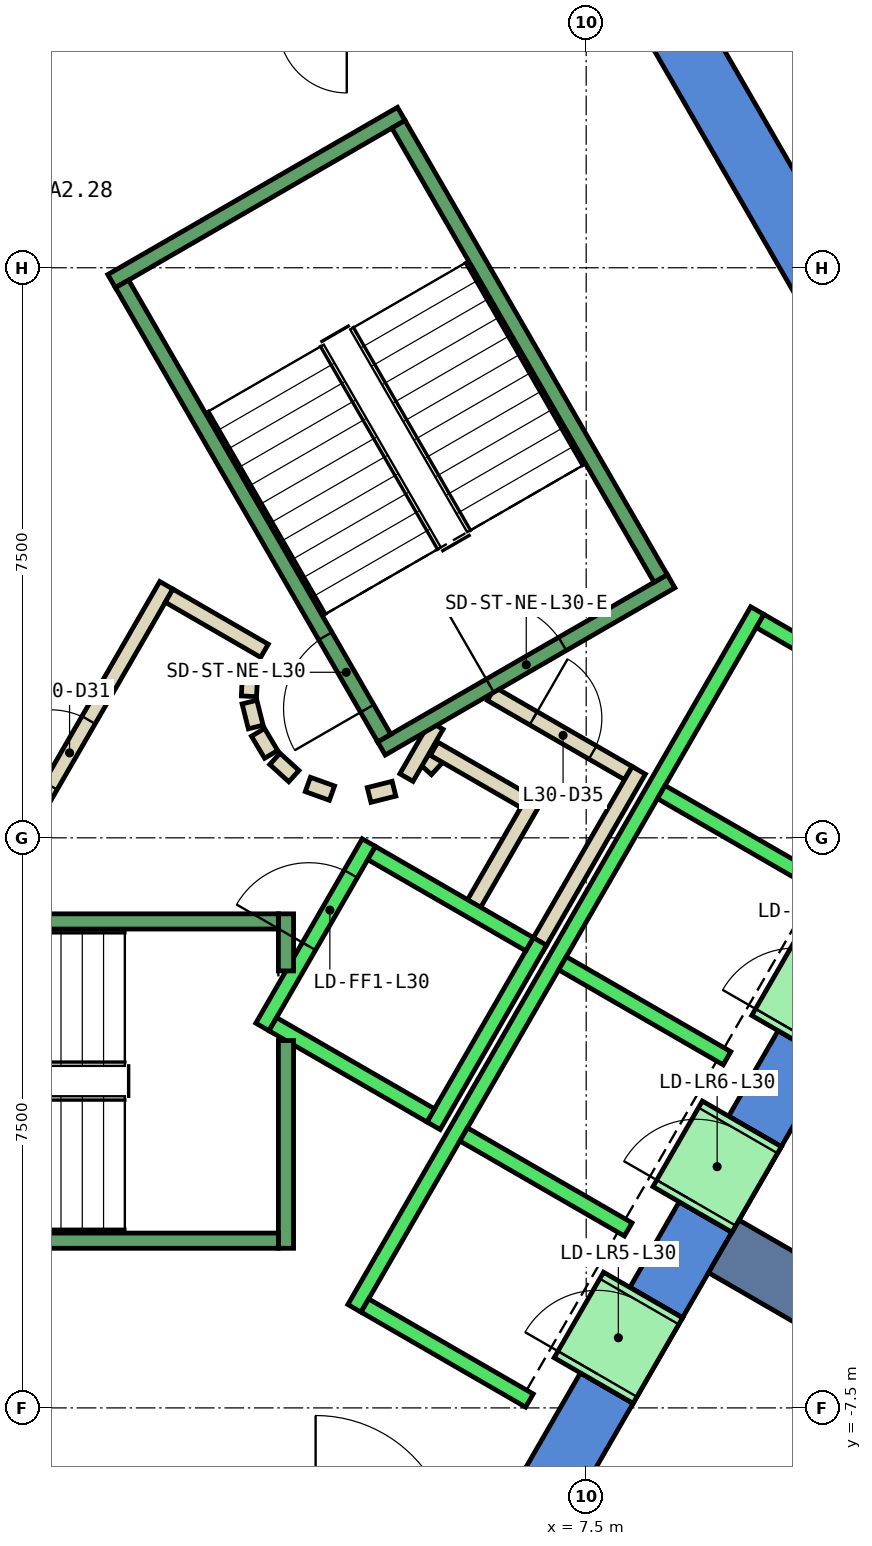
"""IFC4 building model, lengths in metres.
Left out: names, types, materials, properties, quantities, classifications, styles, units other than length and angle.
Written with IfcOpenShell. Run it as: python <this file> out.ifc"""

import sys

from ifc_helpers import new_model, si_unit, direction, frame, frame_2d, origin, place, context, subcontext, project, spatial, polyline, rectangle, outline, extrude, element, fill, save


model = new_model("IFC4")
c1 = context("Model", 3, precision=1e-05, world=origin(), true_north=direction((0.0, 1.0)))
c2 = subcontext(c1, "Body", "Model", "MODEL_VIEW")
j1 = project(units=[si_unit("LENGTHUNIT", "METRE"), si_unit("PLANEANGLEUNIT", "RADIAN")], contexts=[c1])
p1 = place(None, origin())
s1 = spatial("IfcSite", under=j1, at=p1, CompositionType="ELEMENT")
p2 = place(p1, origin())
s2 = spatial("IfcBuilding", under=s1, at=p2, CompositionType="ELEMENT")
p3 = place(p2, frame((0.0, 0.0, 138.2)))
s3 = spatial("IfcBuildingStorey", under=s2, at=p3, CompositionType="ELEMENT", Elevation=138.2)
p4 = place(p3, frame((0.0, 0.0, -0.6)))
e1 = element("IfcWall", 1, at=p4, inside=s3, PredefinedType="SHEAR", context=c2, shape_type="SweptSolid", body=[
    extrude(outline(polyline([(8.517, 11.748), (7.824, 11.348), (12.933, 2.5), (13.856, 2.5), (8.517, 11.748)])), origin(), (0.0, 0.0, 1.0), 4.4),
])
p5 = place(p3, frame((0.0, 0.0, -0.6)))
e2 = element("IfcWall", 2, at=p5, inside=s3, PredefinedType="SHEAR", context=c2, shape_type="SweptSolid", body=[
    extrude(outline(polyline([(8.117, -7.44), (7.424, -7.04), (6.466, -8.7), (6.928, -9.5), (8.117, -7.44)])), origin(), (0.0, 0.0, 1.0), 4.4),
])
p6 = place(p3, frame((0.0, 0.0, -0.6)))
e3 = element("IfcWall", 3, at=p6, inside=s3, PredefinedType="SHEAR", context=c2, shape_type="SweptSolid", body=[
    extrude(outline(polyline([(9.417, -5.189), (8.724, -4.789), (8.075, -5.914), (8.767, -6.314), (9.417, -5.189)])), origin(), (0.0, 0.0, 1.0), 4.4),
])
p7 = place(p3, frame((0.0, 0.0, -0.6)))
e4 = element("IfcWall", 4, at=p7, inside=s3, PredefinedType="SHEAR", context=c2, shape_type="SweptSolid", body=[
    extrude(outline(polyline([(10.717, -2.937), (10.025, -2.537), (9.374, -3.663), (10.067, -4.063), (10.717, -2.937)])), origin(), (0.0, 0.0, 1.0), 4.4),
])
p8 = place(p3, frame((0.0, 0.0, 3.6)))
e5 = element("IfcWall", 5, at=p8, inside=s3, PredefinedType="SHEAR", context=c2, shape_type="SweptSolid", body=[
    extrude(outline(polyline([(8.767, -6.314), (8.075, -5.914), (7.424, -7.04), (8.117, -7.44), (8.767, -6.314)])), origin(), (0.0, 0.0, 1.0), 0.2),
])
p9 = place(p3, frame((0.0, 0.0, 3.6)))
e6 = element("IfcWall", 6, at=p9, inside=s3, PredefinedType="SHEAR", context=c2, shape_type="SweptSolid", body=[
    extrude(outline(polyline([(10.067, -4.063), (9.374, -3.663), (8.724, -4.789), (9.417, -5.189), (10.067, -4.063)])), origin(), (0.0, 0.0, 1.0), 0.2),
])
p10 = place(p3, frame((0.0, 0.0, 3.6)))
e7 = element("IfcWall", 7, at=p10, inside=s3, PredefinedType="SHEAR", context=c2, shape_type="SweptSolid", body=[
    extrude(outline(polyline([(11.367, -1.811), (10.675, -1.411), (10.025, -2.537), (10.717, -2.937), (11.367, -1.811)])), origin(), (0.0, 0.0, 1.0), 0.2),
])
p11 = place(p3, frame((9.31, -5.375, -0.6), z_axis=(0.0, 0.0, 1.0), x_axis=(0.866017533419, -0.500013631625, 0.0)))
e8 = element("IfcWall", 8, at=p11, inside=s3, PredefinedType="SHEAR", context=c2, shape_type="SweptSolid", body=[
    extrude(rectangle(XDim=9.0, YDim=0.8, at=frame_2d((4.5, 0.0))), origin(), (0.0, 0.0, 1.0), 4.4),
])
p12 = place(p3, frame((5.39, 0.898, 0.0), z_axis=(0.0, 0.0, 1.0), x_axis=(0.673828488714, 0.738887791073, 0.0)))
e9 = element("IfcWall", 9, at=p12, inside=s3, PredefinedType="PARTITIONING", context=c2, shape_type="SweptSolid", body=[
    extrude(rectangle(XDim=0.263, YDim=0.2, at=frame_2d((0.131, 0.0))), origin(), (0.0, 0.0, 1.0), 3.8),
])
p13 = place(p3, frame((5.499, 1.172, 0.0), z_axis=(0.0, 0.0, 1.0), x_axis=(0.866333505267, -0.499465972466, 0.0)))
e10 = element("IfcWall", 10, at=p13, inside=s3, PredefinedType="PARTITIONING", context=c2, shape_type="SweptSolid", body=[
    extrude(rectangle(XDim=1.374, YDim=0.2, at=frame_2d((0.687, 0.0))), origin(), (0.0, 0.0, 1.0), 3.8),
])
p14 = place(p3, frame((6.826, 0.522, 0.0), z_axis=(0.0, 0.0, 1.0), x_axis=(-0.500016722714, -0.866015748706, 0.0)))
e11 = element("IfcWall", 11, at=p14, inside=s3, PredefinedType="PARTITIONING", context=c2, shape_type="SweptSolid", body=[
    extrude(rectangle(XDim=1.7, YDim=0.2, at=frame_2d((0.85, 0.0))), origin(), (0.0, 0.0, 1.0), 3.8),
])
p15 = place(p3, frame((6.25, 1.894, 0.0), z_axis=(0.0, 0.0, 1.0), x_axis=(0.866043184279, -0.499969202016, 0.0)))
e12 = element("IfcWall", 12, at=p15, inside=s3, PredefinedType="PARTITIONING", context=c2, shape_type="SweptSolid", body=[
    extrude(rectangle(XDim=2.084, YDim=0.2, at=frame_2d((1.042, 0.0))), origin(), (0.0, 0.0, 1.0), 3.8),
])
p16 = place(p15, frame((0.642, 0.0, 0.0)))
e13 = element("IfcOpeningElement", 13, at=p16, cuts=e12, PredefinedType="OPENING", context=c2, shape_type="SweptSolid", body=[
    extrude(rectangle(XDim=0.9, YDim=2.1, at=frame_2d((0.45, 1.05))), frame((0.0, 0.11, 0.0), z_axis=(0.0, -1.0, 0.0), x_axis=(1.0, 0.0, 0.0)), (0.0, 0.0, 1.0), 0.22),
])
p17 = place(p3, frame((8.192, 0.888, 0.0), z_axis=(0.0, 0.0, 1.0), x_axis=(-0.499940625693, -0.866059680843, 0.0)))
e14 = element("IfcWall", 14, at=p17, inside=s3, PredefinedType="PARTITIONING", context=c2, shape_type="SweptSolid", body=[
    extrude(rectangle(XDim=2.68, YDim=0.2, at=frame_2d((1.34, 0.0))), origin(), (0.0, 0.0, 1.0), 3.8),
])
p18 = place(p3, frame((5.135, 0.793, 0.0), z_axis=(0.0, 0.0, 1.0), x_axis=(0.499526442893, 0.866298639529, 0.0)))
e15 = element("IfcWall", 15, at=p18, inside=s3, PredefinedType="PARTITIONING", context=c2, shape_type="SweptSolid", body=[
    extrude(rectangle(XDim=0.791, YDim=0.2, at=frame_2d((0.396, 0.0))), origin(), (0.0, 0.0, 1.0), 3.8),
])
p19 = place(p3, frame((-0.52, -1.0, 0.0), z_axis=(0.0, 0.0, 1.0), x_axis=(0.50011622646, 0.865958290007, 0.0)))
e16 = element("IfcWall", 16, at=p19, inside=s3, PredefinedType="PARTITIONING", context=c2, shape_type="SweptSolid", body=[
    extrude(rectangle(XDim=4.991, YDim=0.2, at=frame_2d((2.496, 0.0))), origin(), (0.0, 0.0, 1.0), 3.8),
])
p20 = place(p19, frame((1.945, 0.0, 0.0)))
e17 = element("IfcOpeningElement", 17, at=p20, cuts=e16, PredefinedType="OPENING", context=c2, shape_type="SweptSolid", body=[
    extrude(rectangle(XDim=1.0, YDim=2.1, at=frame_2d((0.5, 1.05))), frame((0.0, 0.11, 0.0), z_axis=(0.0, -1.0, 0.0), x_axis=(1.0, 0.0, 0.0)), (0.0, 0.0, 1.0), 0.22),
])
p21 = place(p3, frame((2.012, 3.186, 0.0), z_axis=(0.0, 0.0, 1.0), x_axis=(0.865891012941, -0.500232699559, 0.0)))
e18 = element("IfcWall", 18, at=p21, inside=s3, PredefinedType="PARTITIONING", context=c2, shape_type="SweptSolid", body=[
    extrude(rectangle(XDim=1.449, YDim=0.2, at=frame_2d((0.725, 0.0))), origin(), (0.0, 0.0, 1.0), 3.8),
])
p22 = place(p3, frame((3.079, 2.199, 0.0), z_axis=(0.0, 0.0, 1.0), x_axis=(-0.047771483479, -0.998858290933, 0.0)))
e19 = element("IfcWall", 19, at=p22, inside=s3, PredefinedType="PARTITIONING", context=c2, shape_type="SweptSolid", body=[
    extrude(rectangle(XDim=0.337, YDim=0.2, at=frame_2d((0.169, 0.0))), origin(), (0.0, 0.0, 1.0), 3.8),
])
p23 = place(p3, frame((3.07, 1.786, 0.0), z_axis=(0.0, 0.0, 1.0), x_axis=(0.242705583207, -0.970099994784, 0.0)))
e20 = element("IfcWall", 20, at=p23, inside=s3, PredefinedType="PARTITIONING", context=c2, shape_type="SweptSolid", body=[
    extrude(rectangle(XDim=0.338, YDim=0.2, at=frame_2d((0.169, 0.0))), origin(), (0.0, 0.0, 1.0), 3.8),
])
for number, where, z_axis, x_axis in (
    (21, (3.182, 1.388, 0.0), (0.0, 0.0, 1.0), (0.512, -0.859, 0.0)),
    (22, (3.404, 1.039, 0.0), (0.0, 0.0, 1.0), (0.74, -0.672, 0.0)),
):
    element("IfcWall", number, at=place(p3, frame(where, z_axis=z_axis, x_axis=x_axis)), inside=s3, PredefinedType="PARTITIONING", context=c2, shape_type="SweptSolid", body=[
        extrude(rectangle(XDim=0.338, YDim=0.2, at=frame_2d((0.169, 0.0))), origin(), (0.0, 0.0, 1.0), 3.8),
    ])
p24 = place(p3, frame((3.838, 0.702, 0.0), z_axis=(0.0, 0.0, 1.0), x_axis=(0.941035081519, -0.338308993895, 0.0)))
e23 = element("IfcWall", 23, at=p24, inside=s3, PredefinedType="PARTITIONING", context=c2, shape_type="SweptSolid", body=[
    extrude(rectangle(XDim=0.337, YDim=0.2, at=frame_2d((0.168, 0.0))), origin(), (0.0, 0.0, 1.0), 3.8),
])
p25 = place(p3, frame((4.644, 0.564, 0.0), z_axis=(0.0, 0.0, 1.0), x_axis=(0.969929076366, 0.243387729394, 0.0)))
e24 = element("IfcWall", 24, at=p25, inside=s3, PredefinedType="PARTITIONING", context=c2, shape_type="SweptSolid", body=[
    extrude(rectangle(XDim=0.337, YDim=0.2, at=frame_2d((0.168, 0.0))), origin(), (0.0, 0.0, 1.0), 3.8),
])
p26 = place(p3, frame((12.401, -7.621, 0.0), z_axis=(0.0, 0.0, 1.0), x_axis=(-0.499964151829, -0.866046099747, 0.0)))
e25 = element("IfcWall", 25, at=p26, inside=s3, PredefinedType="PARTITIONING", context=c2, shape_type="SweptSolid", body=[
    extrude(rectangle(XDim=8.656, YDim=0.2, at=frame_2d((4.328, 0.0))), origin(), (0.0, 0.0, 1.0), 3.8),
])
p27 = place(p26, frame((2.694, 0.0, 0.0)))
e26 = element("IfcOpeningElement", 26, at=p27, cuts=e25, PredefinedType="OPENING", context=c2, shape_type="SweptSolid", body=[
    extrude(rectangle(XDim=1.0, YDim=2.1, at=frame_2d((0.5, 1.05))), frame((0.0, 0.11, 0.0), z_axis=(0.0, -1.0, 0.0), x_axis=(1.0, 0.0, 0.0)), (0.0, 0.0, 1.0), 0.22),
])
p28 = place(p26, frame((3.794, 0.0, 0.0)))
e27 = element("IfcOpeningElement", 27, at=p28, cuts=e25, PredefinedType="OPENING", context=c2, shape_type="SweptSolid", body=[
    extrude(rectangle(XDim=1.0, YDim=2.1, at=frame_2d((0.5, 1.05))), frame((0.0, 0.11, 0.0), z_axis=(0.0, -1.0, 0.0), x_axis=(1.0, 0.0, 0.0)), (0.0, 0.0, 1.0), 0.22),
])
p29 = place(p3, frame((3.24, -2.488, 0.0), z_axis=(0.0, 0.0, 1.0), x_axis=(0.49994636267, 0.866056369097, 0.0)))
e28 = element("IfcWall", 28, at=p29, inside=s3, PredefinedType="STANDARD", context=c2, shape_type="SweptSolid", body=[
    extrude(rectangle(XDim=2.8, YDim=0.2, at=frame_2d((1.4, 0.0))), origin(), (0.0, 0.0, 1.0), 3.8),
])
p30 = place(p29, frame((1.225, 0.0, 0.0)))
e29 = element("IfcOpeningElement", 29, at=p30, cuts=e28, PredefinedType="OPENING", context=c2, shape_type="SweptSolid", body=[
    extrude(rectangle(XDim=1.1, YDim=2.1, at=frame_2d((0.55, 1.05))), frame((0.0, 0.11, 0.0), z_axis=(0.0, -1.0, 0.0), x_axis=(1.0, 0.0, 0.0)), (0.0, 0.0, 1.0), 0.22),
])
p31 = place(p3, frame((5.492, -3.788, 0.0), z_axis=(0.0, 0.0, 1.0), x_axis=(0.500011755427, 0.866018616679, 0.0)))
e30 = element("IfcWall", 30, at=p31, inside=s3, PredefinedType="STANDARD", context=c2, shape_type="SweptSolid", body=[
    extrude(rectangle(XDim=2.8, YDim=0.2, at=frame_2d((1.4, 0.0))), origin(), (0.0, 0.0, 1.0), 3.8),
])
p32 = place(p3, frame((3.377, -2.452, 0.0), z_axis=(0.0, 0.0, 1.0), x_axis=(0.865955154139, -0.50012165622, 0.0)))
e31 = element("IfcWall", 31, at=p32, inside=s3, PredefinedType="STANDARD", context=c2, shape_type="SweptSolid", body=[
    extrude(rectangle(XDim=2.4, YDim=0.2, at=frame_2d((1.2, 0.0))), origin(), (0.0, 0.0, 1.0), 3.8),
])
p33 = place(p3, frame((4.677, -0.2, 0.0), z_axis=(0.0, 0.0, 1.0), x_axis=(0.865973769406, -0.500089422704, 0.0)))
e32 = element("IfcWall", 32, at=p33, inside=s3, PredefinedType="STANDARD", context=c2, shape_type="SweptSolid", body=[
    extrude(rectangle(XDim=2.399, YDim=0.2, at=frame_2d((1.2, 0.0))), origin(), (0.0, 0.0, 1.0), 3.8),
])
p34 = place(p3, frame((4.451, -6.19, 0.0), z_axis=(0.0, 0.0, 1.0), x_axis=(0.50000090737, 0.866024879913, 0.0)))
e33 = element("IfcWall", 33, at=p34, inside=s3, PredefinedType="STANDARD", context=c2, shape_type="SweptSolid", body=[
    extrude(rectangle(XDim=10.6, YDim=0.2, at=frame_2d((5.3, 0.0))), origin(), (0.0, 0.0, 1.0), 3.8),
])
for number, where, z_axis, x_axis in (
    (34, (4.588, -6.153, 0.0), (0.0, 0.0, 1.0), (0.866, -0.5, 0.0)),
    (35, (5.888, -3.902, 0.0), (0.0, 0.0, 1.0), (0.866, -0.5, 0.0)),
    (36, (7.188, -1.65, 0.0), (0.0, 0.0, 1.0), (0.866, -0.5, 0.0)),
    (37, (8.488, 0.602, 0.0), (0.0, 0.0, 1.0), (0.866, -0.5, 0.0)),
):
    element("IfcWall", number, at=place(p3, frame(where, z_axis=z_axis, x_axis=x_axis)), inside=s3, PredefinedType="STANDARD", context=c2, shape_type="SweptSolid", body=[
        extrude(rectangle(XDim=2.5, YDim=0.2, at=frame_2d((1.25, 0.0))), origin(), (0.0, 0.0, 1.0), 3.8),
    ])
p35 = place(p3, frame((9.788, 2.853, 0.0), z_axis=(0.0, 0.0, 1.0), x_axis=(0.865998541277, -0.500046524342, 0.0)))
e38 = element("IfcWall", 38, at=p35, inside=s3, PredefinedType="STANDARD", context=c2, shape_type="SweptSolid", body=[
    extrude(rectangle(XDim=2.5, YDim=0.2, at=frame_2d((1.25, 0.0))), origin(), (0.0, 0.0, 1.0), 3.8),
])
p36 = place(p3, frame((7.598, -7.14, 0.0), z_axis=(0.0, 0.0, 1.0), x_axis=(0.500362116554, 0.865816234728, 0.0)))
e39 = element("IfcWall", 39, at=p36, inside=s3, PredefinedType="STANDARD", context=c2, shape_type="SweptSolid", body=[
    extrude(rectangle(XDim=1.299, YDim=1.2, at=frame_2d((0.65, 0.0))), origin(), (0.0, 0.0, 1.0), 2.4),
])
p37 = place(p36, frame((0.1, 0.0, 0.0)))
e40 = element("IfcOpeningElement", 40, at=p37, cuts=e39, PredefinedType="OPENING", context=c2, shape_type="SweptSolid", body=[
    extrude(rectangle(XDim=1.1, YDim=2.3, at=frame_2d((0.55, 1.15))), frame((0.0, 0.61, 0.0), z_axis=(0.0, -1.0, 0.0), x_axis=(1.0, 0.0, 0.0)), (0.0, 0.0, 1.0), 1.22),
])
p38 = place(p3, frame((8.898, -4.889, 0.0), z_axis=(0.0, 0.0, 1.0), x_axis=(0.500036693733, 0.866004217611, 0.0)))
e41 = element("IfcWall", 41, at=p38, inside=s3, PredefinedType="STANDARD", context=c2, shape_type="SweptSolid", body=[
    extrude(rectangle(XDim=1.3, YDim=1.2, at=frame_2d((0.65, 0.0))), origin(), (0.0, 0.0, 1.0), 2.4),
])
p39 = place(p38, frame((0.1, 0.0, 0.0)))
e42 = element("IfcOpeningElement", 42, at=p39, cuts=e41, PredefinedType="OPENING", context=c2, shape_type="SweptSolid", body=[
    extrude(rectangle(XDim=1.1, YDim=2.3, at=frame_2d((0.55, 1.15))), frame((0.0, 0.61, 0.0), z_axis=(0.0, -1.0, 0.0), x_axis=(1.0, 0.0, 0.0)), (0.0, 0.0, 1.0), 1.22),
])
p40 = place(p3, frame((10.198, -2.637, 0.0), z_axis=(0.0, 0.0, 1.0), x_axis=(0.49989585183, 0.866085525409, 0.0)))
e43 = element("IfcWall", 43, at=p40, inside=s3, PredefinedType="STANDARD", context=c2, shape_type="SweptSolid", body=[
    extrude(rectangle(XDim=1.3, YDim=1.2, at=frame_2d((0.65, 0.0))), origin(), (0.0, 0.0, 1.0), 2.4),
])
p41 = place(p40, frame((0.1, 0.0, 0.0)))
e44 = element("IfcOpeningElement", 44, at=p41, cuts=e43, PredefinedType="OPENING", context=c2, shape_type="SweptSolid", body=[
    extrude(rectangle(XDim=1.1, YDim=2.3, at=frame_2d((0.55, 1.15))), frame((0.0, 0.61, 0.0), z_axis=(0.0, -1.0, 0.0), x_axis=(1.0, 0.0, 0.0)), (0.0, 0.0, 1.0), 1.22),
])
p42 = place(p3, frame((3.55, -2.667, 0.0), z_axis=(0.0, 0.0, 1.0), x_axis=(0.0, -1.0, 0.0)))
e45 = element("IfcWall", 45, at=p42, inside=s3, PredefinedType="STANDARD", context=c2, shape_type="SweptSolid", body=[
    extrude(rectangle(XDim=2.733, YDim=0.2, at=frame_2d((1.366, 0.0))), origin(), (0.0, 0.0, 1.0), 3.8),
])
p43 = place(p3, frame((3.55, -1.0, 0.0), z_axis=(0.0, 0.0, 1.0), x_axis=(0.0, -1.0, 0.0)))
e46 = element("IfcWall", 46, at=p43, inside=s3, PredefinedType="STANDARD", context=c2, shape_type="SweptSolid", body=[
    extrude(rectangle(XDim=0.751, YDim=0.2, at=frame_2d((0.375, 0.0))), origin(), (0.0, 0.0, 1.0), 3.8),
])
p44 = place(p3, frame((-3.45, -1.1, 0.0), z_axis=(0.0, 0.0, 1.0), x_axis=(1.0, 0.0, 0.0)))
e47 = element("IfcWall", 47, at=p44, inside=s3, PredefinedType="STANDARD", context=c2, shape_type="SweptSolid", body=[
    extrude(rectangle(XDim=6.9, YDim=0.2, at=frame_2d((3.45, 0.0))), origin(), (0.0, 0.0, 1.0), 3.8),
])
p45 = place(p44, frame((0.45, 0.0, 0.0)))
e48 = element("IfcOpeningElement", 48, at=p45, cuts=e47, PredefinedType="OPENING", context=c2, shape_type="SweptSolid", body=[
    extrude(rectangle(XDim=1.1, YDim=2.2, at=frame_2d((0.55, 1.1))), frame((0.0, 0.11, 0.0), z_axis=(0.0, -1.0, 0.0), x_axis=(1.0, 0.0, 0.0)), (0.0, 0.0, 1.0), 0.22),
])
p46 = place(p3, frame((-3.45, -5.3, 0.0), z_axis=(0.0, 0.0, 1.0), x_axis=(1.0, 0.0, 0.0)))
e49 = element("IfcWall", 49, at=p46, inside=s3, PredefinedType="STANDARD", context=c2, shape_type="SweptSolid", body=[
    extrude(rectangle(XDim=6.9, YDim=0.2, at=frame_2d((3.45, 0.0))), origin(), (0.0, 0.0, 1.0), 3.8),
])
p47 = place(p3, frame((4.806, 1.176, 0.0), z_axis=(0.0, 0.0, 1.0), x_axis=(0.866059941101, 0.499940174841, 0.0)))
e50 = element("IfcWall", 50, at=p47, inside=s3, PredefinedType="STANDARD", context=c2, shape_type="SweptSolid", body=[
    extrude(rectangle(XDim=4.4, YDim=0.2, at=frame_2d((2.2, 0.0))), origin(), (0.0, 0.0, 1.0), 3.8),
])
p48 = place(p47, frame((1.65, 0.0, 0.0)))
e51 = element("IfcOpeningElement", 51, at=p48, cuts=e50, PredefinedType="OPENING", context=c2, shape_type="SweptSolid", body=[
    extrude(rectangle(XDim=1.1, YDim=2.2, at=frame_2d((0.55, 1.1))), frame((0.0, 0.11, 0.0), z_axis=(0.0, -1.0, 0.0), x_axis=(1.0, 0.0, 0.0)), (0.0, 0.0, 1.0), 0.22),
])
p49 = place(p3, frame((1.256, 7.324, 0.0), z_axis=(0.0, 0.0, 1.0), x_axis=(0.866046073146, 0.499964197906, 0.0)))
e52 = element("IfcWall", 52, at=p49, inside=s3, PredefinedType="STANDARD", context=c2, shape_type="SweptSolid", body=[
    extrude(rectangle(XDim=4.4, YDim=0.2, at=frame_2d((2.2, 0.0))), origin(), (0.0, 0.0, 1.0), 3.8),
])
p50 = place(p3, frame((4.843, 1.312, 0.0), z_axis=(0.0, 0.0, 1.0), x_axis=(-0.499963383562, 0.866046543262, 0.0)))
e53 = element("IfcWall", 53, at=p50, inside=s3, PredefinedType="STANDARD", context=c2, shape_type="SweptSolid", body=[
    extrude(rectangle(XDim=6.9, YDim=0.2, at=frame_2d((3.45, 0.0))), origin(), (0.0, 0.0, 1.0), 3.8),
])
p51 = place(p50, frame((0.45, 0.0, 0.0)))
e54 = element("IfcOpeningElement", 54, at=p51, cuts=e53, PredefinedType="OPENING", context=c2, shape_type="SweptSolid", body=[
    extrude(rectangle(XDim=1.1, YDim=2.2, at=frame_2d((0.55, 1.1))), frame((0.0, 0.11, 0.0), z_axis=(0.0, -1.0, 0.0), x_axis=(1.0, 0.0, 0.0)), (0.0, 0.0, 1.0), 0.22),
])
p52 = place(p3, frame((8.48, 3.412, 0.0), z_axis=(0.0, 0.0, 1.0), x_axis=(-0.499978703459, 0.866037698999, 0.0)))
e55 = element("IfcWall", 55, at=p52, inside=s3, PredefinedType="STANDARD", context=c2, shape_type="SweptSolid", body=[
    extrude(rectangle(XDim=6.9, YDim=0.2, at=frame_2d((3.45, 0.0))), origin(), (0.0, 0.0, 1.0), 3.8),
])
p53 = place(p20, origin())
e56 = element("IfcDoor", 56, at=p53, inside=s3, OperationType="SINGLE_SWING_LEFT", PredefinedType="DOOR", context=c2, shape_type="SweptSolid", body=[
    extrude(rectangle(XDim=1.0, YDim=2.1, at=frame_2d((0.5, 1.05))), frame((0.0, 0.025, 0.0), z_axis=(0.0, -1.0, 0.0), x_axis=(1.0, 0.0, 0.0)), (0.0, 0.0, 1.0), 0.05),
])
fill(e17, e56)
p54 = place(p16, origin())
e57 = element("IfcDoor", 57, at=p54, inside=s3, OperationType="SINGLE_SWING_LEFT", PredefinedType="DOOR", context=c2, shape_type="SweptSolid", body=[
    extrude(rectangle(XDim=0.9, YDim=2.1, at=frame_2d((0.45, 1.05))), frame((0.0, 0.025, 0.0), z_axis=(0.0, -1.0, 0.0), x_axis=(1.0, 0.0, 0.0)), (0.0, 0.0, 1.0), 0.05),
])
fill(e13, e57)
p55 = place(p37, origin())
e58 = element("IfcDoor", 58, at=p55, inside=s3, OperationType="SLIDING_TO_LEFT", PredefinedType="DOOR", context=c2, shape_type="SweptSolid", body=[
    extrude(rectangle(XDim=1.1, YDim=2.3, at=frame_2d((0.55, 1.15))), frame((0.0, 0.025, 0.0), z_axis=(0.0, -1.0, 0.0), x_axis=(1.0, 0.0, 0.0)), (0.0, 0.0, 1.0), 0.05),
])
fill(e40, e58)
p56 = place(p39, origin())
e59 = element("IfcDoor", 59, at=p56, inside=s3, OperationType="SLIDING_TO_LEFT", PredefinedType="DOOR", context=c2, shape_type="SweptSolid", body=[
    extrude(rectangle(XDim=1.1, YDim=2.3, at=frame_2d((0.55, 1.15))), frame((0.0, 0.025, 0.0), z_axis=(0.0, -1.0, 0.0), x_axis=(1.0, 0.0, 0.0)), (0.0, 0.0, 1.0), 0.05),
])
fill(e42, e59)
p57 = place(p30, origin())
e60 = element("IfcDoor", 60, at=p57, inside=s3, OperationType="SLIDING_TO_LEFT", PredefinedType="DOOR", context=c2, shape_type="SweptSolid", body=[
    extrude(rectangle(XDim=1.1, YDim=2.1, at=frame_2d((0.55, 1.05))), frame((0.0, 0.025, 0.0), z_axis=(0.0, -1.0, 0.0), x_axis=(1.0, 0.0, 0.0)), (0.0, 0.0, 1.0), 0.05),
])
fill(e29, e60)
p58 = place(p51, origin())
e61 = element("IfcDoor", 61, at=p58, inside=s3, OperationType="SINGLE_SWING_LEFT", PredefinedType="DOOR", context=c2, shape_type="SweptSolid", body=[
    extrude(rectangle(XDim=1.1, YDim=2.2, at=frame_2d((0.55, 1.1))), frame((0.0, 0.025, 0.0), z_axis=(0.0, -1.0, 0.0), x_axis=(1.0, 0.0, 0.0)), (0.0, 0.0, 1.0), 0.05),
])
fill(e54, e61)
p59 = place(p48, origin())
e62 = element("IfcDoor", 62, at=p59, inside=s3, OperationType="SINGLE_SWING_LEFT", PredefinedType="DOOR", context=c2, shape_type="SweptSolid", body=[
    extrude(rectangle(XDim=1.1, YDim=2.2, at=frame_2d((0.55, 1.1))), frame((0.0, 0.025, 0.0), z_axis=(0.0, -1.0, 0.0), x_axis=(1.0, 0.0, 0.0)), (0.0, 0.0, 1.0), 0.05),
])
fill(e51, e62)
save(model, sys.argv[1])
